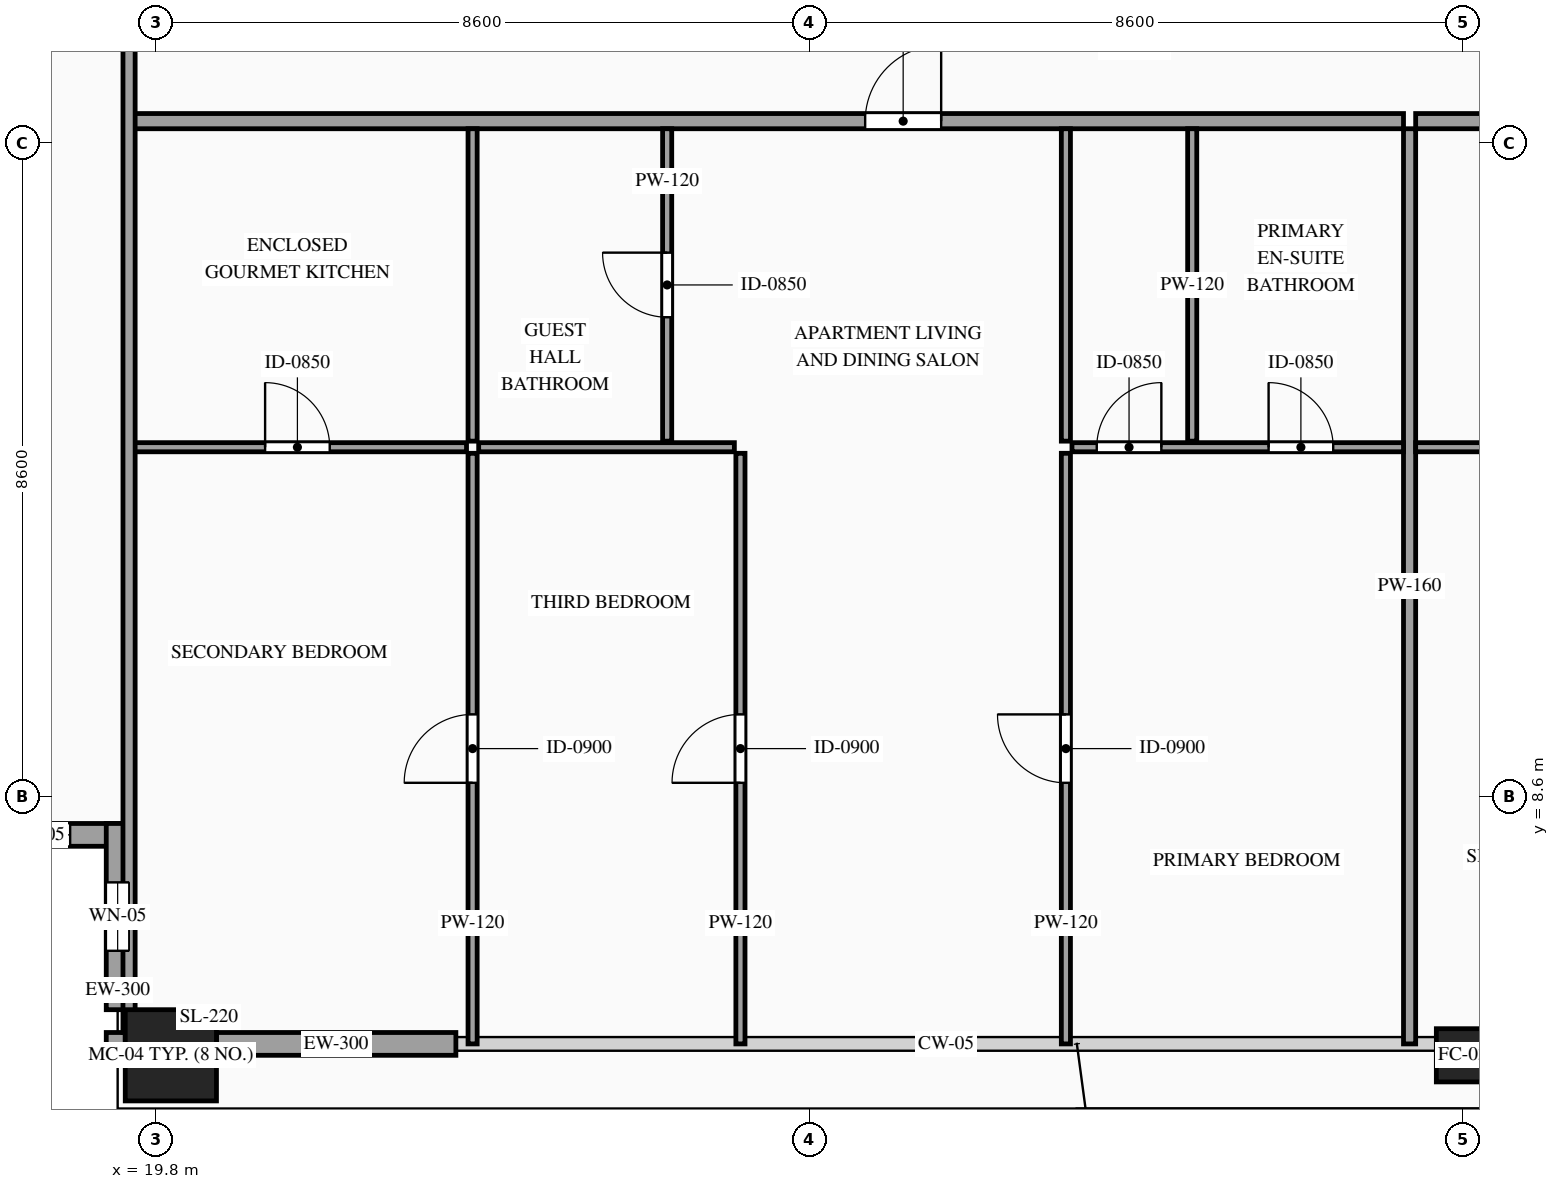
"""IFC4 building model, lengths in metres.
Left out: names, types, materials, properties, quantities, classifications, styles, units other than length and angle.
Written with IfcOpenShell. Run it as: python <this file> out.ifc"""

import sys

from ifc_helpers import new_model, si_unit, direction, frame, frame_2d, origin, origin_2d, place, context, subcontext, project, spatial, rectangle, hollow_rectangle, extrude, source, transform, mapped, element, fill, save


model = new_model("IFC4")
c1 = context("Model", 3, precision=1e-05, world=origin(), true_north=direction((0.0, 1.0)))
c2 = subcontext(c1, "Body", "Model", "MODEL_VIEW")
j1 = project(units=[si_unit("LENGTHUNIT", "METRE"), si_unit("PLANEANGLEUNIT", "RADIAN")], contexts=[c1])
p1 = place(None, origin())
s1 = spatial("IfcSite", under=j1, at=p1, CompositionType="ELEMENT")
p2 = place(p1, origin())
s2 = spatial("IfcBuilding", under=s1, at=p2, CompositionType="ELEMENT")
p3 = place(p2, frame((0.0, 0.0, 255.6)))
s3 = spatial("IfcBuildingStorey", under=s2, at=p3, CompositionType="ELEMENT", Elevation=255.6)
m1 = source(origin(), c2, "Body", "SweptSolid", [
    extrude(hollow_rectangle(XDim=1.2, YDim=1.2, WallThickness=0.055, at=origin_2d()), origin(), (0.0, 0.0, 1.0), 3.5),
])
p4 = place(p3, frame((20.0, 5.2, 0.0), z_axis=(0.0, 0.0, 1.0), x_axis=(1.0, 0.0, 0.0)))
e1 = element("IfcColumn", 1, at=p4, inside=s3, PredefinedType="COLUMN", context=c2, shape_type="MappedRepresentation", body=[
    mapped(m1, transform((0.0, 0.0, 0.0), scale=1.0)),
])
m2 = source(origin(), c2, "Body", "SweptSolid", [
    extrude(hollow_rectangle(XDim=0.7, YDim=0.7, WallThickness=0.032, at=origin_2d()), origin(), (0.0, 0.0, 1.0), 3.5),
])
p5 = place(p3, frame((37.0, 5.2, 0.0), z_axis=(0.0, 0.0, 1.0), x_axis=(1.0, 0.0, 0.0)))
e2 = element("IfcColumn", 2, at=p5, inside=s3, PredefinedType="COLUMN", context=c2, shape_type="MappedRepresentation", body=[
    mapped(m2, transform((0.0, 0.0, 0.0), scale=1.0)),
])
p6 = place(p3, frame((17.0, 8.1, 0.0), z_axis=(0.0, 0.0, 1.0), x_axis=(1.0, 0.0, 0.0)))
e3 = element("IfcWall", 3, at=p6, inside=s3, PredefinedType="SOLIDWALL", context=c2, shape_type="SweptSolid", body=[
    extrude(rectangle(XDim=2.45, YDim=0.3, at=frame_2d((1.225, 0.0))), origin(), (0.0, 0.0, 1.0), 3.2),
])
p7 = place(p6, frame((0.775, 0.0, 0.75)))
e4 = element("IfcOpeningElement", 4, at=p7, cuts=e3, PredefinedType="OPENING", context=c2, shape_type="SweptSolid", body=[
    extrude(rectangle(XDim=0.9, YDim=1.5, at=frame_2d((0.45, 0.75))), frame((0.0, 0.165, 0.0), z_axis=(0.0, -1.0, 0.0), x_axis=(1.0, 0.0, 0.0)), (0.0, 0.0, 1.0), 0.33),
])
p8 = place(p3, frame((19.3, 8.25, 0.0), z_axis=(0.0, 0.0, 1.0), x_axis=(0.0, -1.0, 0.0)))
e5 = element("IfcWall", 5, at=p8, inside=s3, PredefinedType="SOLIDWALL", context=c2, shape_type="SweptSolid", body=[
    extrude(rectangle(XDim=2.45, YDim=0.3, at=frame_2d((1.225, 0.0))), origin(), (0.0, 0.0, 1.0), 3.2),
])
p9 = place(p8, frame((0.775, 0.0, 0.75)))
e6 = element("IfcOpeningElement", 6, at=p9, cuts=e5, PredefinedType="OPENING", context=c2, shape_type="SweptSolid", body=[
    extrude(rectangle(XDim=0.9, YDim=1.5, at=frame_2d((0.45, 0.75))), frame((0.0, 0.165, 0.0), z_axis=(0.0, -1.0, 0.0), x_axis=(1.0, 0.0, 0.0)), (0.0, 0.0, 1.0), 0.33),
])
m3 = source(origin(), c2, "Body", "SweptSolid", [
    extrude(rectangle(XDim=0.25, YDim=0.3, at=frame_2d((0.125, 0.0))), origin(), (0.0, 0.0, 1.0), 3.2),
])
p10 = place(p3, frame((19.15, 5.35, 0.0), z_axis=(0.0, 0.0, 1.0), x_axis=(1.0, 0.0, 0.0)))
e7 = element("IfcWall", 7, at=p10, inside=s3, PredefinedType="SOLIDWALL", context=c2, shape_type="MappedRepresentation", body=[
    mapped(m3, transform((0.0, 0.0, 0.0), scale=1.0)),
])
m4 = source(origin(), c2, "Body", "SweptSolid", [
    extrude(rectangle(XDim=3.15, YDim=0.3, at=frame_2d((1.575, 0.0))), origin(), (0.0, 0.0, 1.0), 2.755),
])
p11 = place(p3, frame((20.6, 5.35, 0.0), z_axis=(0.0, 0.0, 1.0), x_axis=(1.0, 0.0, 0.0)))
e8 = element("IfcWall", 8, at=p11, inside=s3, PredefinedType="SOLIDWALL", context=c2, shape_type="MappedRepresentation", body=[
    mapped(m4, transform((0.0, 0.0, 0.0), scale=1.0)),
])
p12 = place(p3, frame((19.44, 17.49, 0.0), z_axis=(0.0, 0.0, 1.0), x_axis=(1.0, 0.0, 0.0)))
e9 = element("IfcWall", 9, at=p12, inside=s3, PredefinedType="PARTITIONING", context=c2, shape_type="SweptSolid", body=[
    extrude(rectangle(XDim=16.778, YDim=0.2, at=frame_2d((8.389, 0.0))), origin(), (0.0, 0.0, 1.0), 3.2),
])
p13 = place(p12, frame((9.695, 0.0, 0.0)))
e10 = element("IfcOpeningElement", 10, at=p13, cuts=e9, PredefinedType="OPENING", context=c2, shape_type="SweptSolid", body=[
    extrude(rectangle(XDim=1.0, YDim=2.2, at=frame_2d((0.5, 1.1))), frame((0.0, 0.115, 0.0), z_axis=(0.0, -1.0, 0.0), x_axis=(1.0, 0.0, 0.0)), (0.0, 0.0, 1.0), 0.23),
])
m5 = source(origin(), c2, "Body", "SweptSolid", [
    extrude(rectangle(XDim=12.04, YDim=0.16, at=frame_2d((6.02, 0.0))), origin(), (0.0, 0.0, 1.0), 3.2),
])
p14 = place(p3, frame((36.298, 5.35, 0.0), z_axis=(0.0, 0.0, 1.0), x_axis=(0.0, 1.0, 0.0)))
e11 = element("IfcWall", 11, at=p14, inside=s3, PredefinedType="PARTITIONING", context=c2, shape_type="MappedRepresentation", body=[
    mapped(m5, transform((0.0, 0.0, 0.0), scale=1.0)),
])
p15 = place(p3, frame((19.44, 13.2, 0.0), z_axis=(0.0, 0.0, 1.0), x_axis=(1.0, 0.0, 0.0)))
e12 = element("IfcWall", 12, at=p15, inside=s3, PredefinedType="PARTITIONING", context=c2, shape_type="SweptSolid", body=[
    extrude(rectangle(XDim=4.45, YDim=0.12, at=frame_2d((2.225, 0.0))), origin(), (0.0, 0.0, 1.0), 3.2),
])
p16 = place(p15, frame((1.8, 0.0, 0.0)))
e13 = element("IfcOpeningElement", 13, at=p16, cuts=e12, PredefinedType="OPENING", context=c2, shape_type="SweptSolid", body=[
    extrude(rectangle(XDim=0.85, YDim=2.1, at=frame_2d((0.425, 1.05))), frame((0.0, 0.075, 0.0), z_axis=(0.0, -1.0, 0.0), x_axis=(1.0, 0.0, 0.0)), (0.0, 0.0, 1.0), 0.15),
])
m6 = source(origin(), c2, "Body", "SweptSolid", [
    extrude(rectangle(XDim=4.11, YDim=0.12, at=frame_2d((2.055, 0.0))), origin(), (0.0, 0.0, 1.0), 3.2),
])
p17 = place(p3, frame((23.97, 13.28, 0.0), z_axis=(0.0, 0.0, 1.0), x_axis=(0.0, 1.0, 0.0)))
e14 = element("IfcWall", 14, at=p17, inside=s3, PredefinedType="PARTITIONING", context=c2, shape_type="MappedRepresentation", body=[
    mapped(m6, transform((0.0, 0.0, 0.0), scale=1.0)),
])
p18 = place(p3, frame((26.53, 13.28, 0.0), z_axis=(0.0, 0.0, 1.0), x_axis=(0.0, 1.0, 0.0)))
e15 = element("IfcWall", 15, at=p18, inside=s3, PredefinedType="PARTITIONING", context=c2, shape_type="SweptSolid", body=[
    extrude(rectangle(XDim=4.11, YDim=0.12, at=frame_2d((2.055, 0.0))), origin(), (0.0, 0.0, 1.0), 3.2),
])
p19 = place(p18, frame((1.63, 0.0, 0.0)))
e16 = element("IfcOpeningElement", 16, at=p19, cuts=e15, PredefinedType="OPENING", context=c2, shape_type="SweptSolid", body=[
    extrude(rectangle(XDim=0.85, YDim=2.1, at=frame_2d((0.425, 1.05))), frame((0.0, 0.075, 0.0), z_axis=(0.0, -1.0, 0.0), x_axis=(1.0, 0.0, 0.0)), (0.0, 0.0, 1.0), 0.15),
])
for number, where, z_axis, x_axis in (
    (17, (33.438, 13.28, 0.0), (0.0, 0.0, 1.0), (0.0, 1.0, 0.0)),
    (18, (31.776, 13.28, 0.0), (0.0, 0.0, 1.0), (0.0, 1.0, 0.0)),
):
    element("IfcWall", number, at=place(p3, frame(where, z_axis=z_axis, x_axis=x_axis)), inside=s3, PredefinedType="PARTITIONING", context=c2, shape_type="MappedRepresentation", body=[
        mapped(m6, transform((0.0, 0.0, 0.0), scale=1.0)),
    ])
p20 = place(p3, frame((23.97, 5.35, 0.0), z_axis=(0.0, 0.0, 1.0), x_axis=(0.0, 1.0, 0.0)))
e19 = element("IfcWall", 19, at=p20, inside=s3, PredefinedType="PARTITIONING", context=c2, shape_type="SweptSolid", body=[
    extrude(rectangle(XDim=7.77, YDim=0.12, at=frame_2d((3.885, 0.0))), origin(), (0.0, 0.0, 1.0), 3.2),
])
p21 = place(p20, frame((3.435, 0.0, 0.0)))
e20 = element("IfcOpeningElement", 20, at=p21, cuts=e19, PredefinedType="OPENING", context=c2, shape_type="SweptSolid", body=[
    extrude(rectangle(XDim=0.9, YDim=2.15, at=frame_2d((0.45, 1.075))), frame((0.0, 0.075, 0.0), z_axis=(0.0, -1.0, 0.0), x_axis=(1.0, 0.0, 0.0)), (0.0, 0.0, 1.0), 0.15),
])
p22 = place(p3, frame((31.856, 13.2, 0.0), z_axis=(0.0, 0.0, 1.0), x_axis=(1.0, 0.0, 0.0)))
e21 = element("IfcWall", 21, at=p22, inside=s3, PredefinedType="PARTITIONING", context=c2, shape_type="SweptSolid", body=[
    extrude(rectangle(XDim=4.362, YDim=0.12, at=frame_2d((2.181, 0.0))), origin(), (0.0, 0.0, 1.0), 3.2),
])
p23 = place(p22, frame((2.587, 0.0, 0.0)))
e22 = element("IfcOpeningElement", 22, at=p23, cuts=e21, PredefinedType="OPENING", context=c2, shape_type="SweptSolid", body=[
    extrude(rectangle(XDim=0.85, YDim=2.1, at=frame_2d((0.425, 1.05))), frame((0.0, 0.075, 0.0), z_axis=(0.0, -1.0, 0.0), x_axis=(1.0, 0.0, 0.0)), (0.0, 0.0, 1.0), 0.15),
])
p24 = place(p22, frame((0.326, 0.0, 0.0)))
e23 = element("IfcOpeningElement", 23, at=p24, cuts=e21, PredefinedType="OPENING", context=c2, shape_type="SweptSolid", body=[
    extrude(rectangle(XDim=0.85, YDim=2.1, at=frame_2d((0.425, 1.05))), frame((0.0, 0.075, 0.0), z_axis=(0.0, -1.0, 0.0), x_axis=(1.0, 0.0, 0.0)), (0.0, 0.0, 1.0), 0.15),
])
p25 = place(p3, frame((31.776, 5.35, 0.0), z_axis=(0.0, 0.0, 1.0), x_axis=(0.0, 1.0, 0.0)))
e24 = element("IfcWall", 24, at=p25, inside=s3, PredefinedType="PARTITIONING", context=c2, shape_type="SweptSolid", body=[
    extrude(rectangle(XDim=7.77, YDim=0.12, at=frame_2d((3.885, 0.0))), origin(), (0.0, 0.0, 1.0), 3.2),
])
p26 = place(p25, frame((3.435, 0.0, 0.0)))
e25 = element("IfcOpeningElement", 25, at=p26, cuts=e24, PredefinedType="OPENING", context=c2, shape_type="SweptSolid", body=[
    extrude(rectangle(XDim=0.9, YDim=2.15, at=frame_2d((0.45, 1.075))), frame((0.0, 0.075, 0.0), z_axis=(0.0, -1.0, 0.0), x_axis=(1.0, 0.0, 0.0)), (0.0, 0.0, 1.0), 0.15),
])
m7 = source(origin(), c2, "Body", "SweptSolid", [
    extrude(rectangle(XDim=3.364, YDim=0.12, at=frame_2d((1.682, 0.0))), origin(), (0.0, 0.0, 1.0), 3.2),
])
p27 = place(p3, frame((24.05, 13.2, 0.0), z_axis=(0.0, 0.0, 1.0), x_axis=(1.0, 0.0, 0.0)))
e26 = element("IfcWall", 26, at=p27, inside=s3, PredefinedType="PARTITIONING", context=c2, shape_type="MappedRepresentation", body=[
    mapped(m7, transform((0.0, 0.0, 0.0), scale=1.0)),
])
p28 = place(p3, frame((27.494, 5.35, 0.0), z_axis=(0.0, 0.0, 1.0), x_axis=(0.0, 1.0, 0.0)))
e27 = element("IfcWall", 27, at=p28, inside=s3, PredefinedType="PARTITIONING", context=c2, shape_type="SweptSolid", body=[
    extrude(rectangle(XDim=7.77, YDim=0.12, at=frame_2d((3.885, 0.0))), origin(), (0.0, 0.0, 1.0), 3.2),
])
p29 = place(p28, frame((3.435, 0.0, 0.0)))
e28 = element("IfcOpeningElement", 28, at=p29, cuts=e27, PredefinedType="OPENING", context=c2, shape_type="SweptSolid", body=[
    extrude(rectangle(XDim=0.9, YDim=2.15, at=frame_2d((0.45, 1.075))), frame((0.0, 0.075, 0.0), z_axis=(0.0, -1.0, 0.0), x_axis=(1.0, 0.0, 0.0)), (0.0, 0.0, 1.0), 0.15),
])
p30 = place(p3, frame((36.378, 17.49, 0.0), z_axis=(0.0, 0.0, 1.0), x_axis=(1.0, 0.0, 0.0)))
e29 = element("IfcWall", 29, at=p30, inside=s3, PredefinedType="PARTITIONING", context=c2, shape_type="SweptSolid", body=[
    extrude(rectangle(XDim=18.182, YDim=0.2, at=frame_2d((9.091, 0.0))), origin(), (0.0, 0.0, 1.0), 3.2),
])
p31 = place(p30, frame((10.528, 0.0, 0.0)))
e30 = element("IfcOpeningElement", 30, at=p31, cuts=e29, PredefinedType="OPENING", context=c2, shape_type="SweptSolid", body=[
    extrude(rectangle(XDim=1.0, YDim=2.2, at=frame_2d((0.5, 1.1))), frame((0.0, 0.115, 0.0), z_axis=(0.0, -1.0, 0.0), x_axis=(1.0, 0.0, 0.0)), (0.0, 0.0, 1.0), 0.23),
])
p32 = place(p3, frame((36.378, 13.2, 0.0), z_axis=(0.0, 0.0, 1.0), x_axis=(1.0, 0.0, 0.0)))
e31 = element("IfcWall", 31, at=p32, inside=s3, PredefinedType="PARTITIONING", context=c2, shape_type="SweptSolid", body=[
    extrude(rectangle(XDim=4.545, YDim=0.12, at=frame_2d((2.272, 0.0))), origin(), (0.0, 0.0, 1.0), 3.2),
])
p33 = place(p32, frame((1.847, 0.0, 0.0)))
e32 = element("IfcOpeningElement", 32, at=p33, cuts=e31, PredefinedType="OPENING", context=c2, shape_type="SweptSolid", body=[
    extrude(rectangle(XDim=0.85, YDim=2.1, at=frame_2d((0.425, 1.05))), frame((0.0, 0.075, 0.0), z_axis=(0.0, -1.0, 0.0), x_axis=(1.0, 0.0, 0.0)), (0.0, 0.0, 1.0), 0.15),
])
m8 = source(origin(), c2, "Body", "SweptSolid", [
    extrude(rectangle(XDim=26.69, YDim=0.16, at=frame_2d((13.345, 0.0))), origin(), (0.0, 0.0, 1.0), 3.2),
])
p34 = place(p3, frame((19.45, 5.5, 0.0), z_axis=(0.0, 0.0, 1.0), x_axis=(0.0, 1.0, 0.0)))
e33 = element("IfcWall", 33, at=p34, inside=s3, PredefinedType="PARTITIONING", context=c2, shape_type="MappedRepresentation", body=[
    mapped(m8, transform((0.0, 0.0, 0.0), scale=1.0)),
])
m9 = source(origin(), c2, "Body", "SweptSolid", [
    extrude(rectangle(XDim=0.9, YDim=1.5, at=frame_2d((0.45, 0.75))), frame((0.0, 0.03, 0.0), z_axis=(0.0, -1.0, 0.0), x_axis=(1.0, 0.0, 0.0)), (0.0, 0.0, 1.0), 0.06),
])
p35 = place(p7, origin())
e34 = element("IfcWindow", 34, at=p35, inside=s3, PartitioningType="SINGLE_PANEL", PredefinedType="WINDOW", context=c2, shape_type="MappedRepresentation", body=[
    mapped(m9, transform((0.0, 0.0, 0.0), scale=1.0)),
])
fill(e4, e34)
p36 = place(p9, origin())
e35 = element("IfcWindow", 35, at=p36, inside=s3, PartitioningType="SINGLE_PANEL", PredefinedType="WINDOW", context=c2, shape_type="MappedRepresentation", body=[
    mapped(m9, transform((0.0, 0.0, 0.0), scale=1.0)),
])
fill(e6, e35)
m10 = source(origin(), c2, "Body", "SweptSolid", [
    extrude(rectangle(XDim=1.0, YDim=2.2, at=frame_2d((0.5, 1.1))), frame((0.0, 0.025, 0.0), z_axis=(0.0, -1.0, 0.0), x_axis=(1.0, 0.0, 0.0)), (0.0, 0.0, 1.0), 0.05),
])
p37 = place(p13, origin())
e36 = element("IfcDoor", 36, at=p37, inside=s3, OperationType="SINGLE_SWING_RIGHT", PredefinedType="DOOR", context=c2, shape_type="MappedRepresentation", body=[
    mapped(m10, transform((0.0, 0.0, 0.0), scale=1.0)),
])
fill(e10, e36)
m11 = source(origin(), c2, "Body", "SweptSolid", [
    extrude(rectangle(XDim=0.85, YDim=2.1, at=frame_2d((0.425, 1.05))), frame((0.0, 0.025, 0.0), z_axis=(0.0, -1.0, 0.0), x_axis=(1.0, 0.0, 0.0)), (0.0, 0.0, 1.0), 0.05),
])
p38 = place(p16, origin())
e37 = element("IfcDoor", 37, at=p38, inside=s3, OperationType="SINGLE_SWING_LEFT", PredefinedType="DOOR", context=c2, shape_type="MappedRepresentation", body=[
    mapped(m11, transform((0.0, 0.0, 0.0), scale=1.0)),
])
fill(e13, e37)
p39 = place(p19, origin())
e38 = element("IfcDoor", 38, at=p39, inside=s3, OperationType="SINGLE_SWING_RIGHT", PredefinedType="DOOR", context=c2, shape_type="MappedRepresentation", body=[
    mapped(m11, transform((0.0, 0.0, 0.0), scale=1.0)),
])
fill(e16, e38)
p40 = place(p23, origin())
e39 = element("IfcDoor", 39, at=p40, inside=s3, OperationType="SINGLE_SWING_LEFT", PredefinedType="DOOR", context=c2, shape_type="MappedRepresentation", body=[
    mapped(m11, transform((0.0, 0.0, 0.0), scale=1.0)),
])
fill(e22, e39)
p41 = place(p24, origin())
e40 = element("IfcDoor", 40, at=p41, inside=s3, OperationType="SINGLE_SWING_RIGHT", PredefinedType="DOOR", context=c2, shape_type="MappedRepresentation", body=[
    mapped(m11, transform((0.0, 0.0, 0.0), scale=1.0)),
])
fill(e23, e40)
m12 = source(origin(), c2, "Body", "SweptSolid", [
    extrude(rectangle(XDim=0.9, YDim=2.15, at=frame_2d((0.45, 1.075))), frame((0.0, 0.025, 0.0), z_axis=(0.0, -1.0, 0.0), x_axis=(1.0, 0.0, 0.0)), (0.0, 0.0, 1.0), 0.05),
])
p42 = place(p21, origin())
e41 = element("IfcDoor", 41, at=p42, inside=s3, OperationType="SINGLE_SWING_LEFT", PredefinedType="DOOR", context=c2, shape_type="MappedRepresentation", body=[
    mapped(m12, transform((0.0, 0.0, 0.0), scale=1.0)),
])
fill(e20, e41)
p43 = place(p26, origin())
e42 = element("IfcDoor", 42, at=p43, inside=s3, OperationType="SINGLE_SWING_RIGHT", PredefinedType="DOOR", context=c2, shape_type="MappedRepresentation", body=[
    mapped(m12, transform((0.0, 0.0, 0.0), scale=1.0)),
])
fill(e25, e42)
p44 = place(p29, origin())
e43 = element("IfcDoor", 43, at=p44, inside=s3, OperationType="SINGLE_SWING_LEFT", PredefinedType="DOOR", context=c2, shape_type="MappedRepresentation", body=[
    mapped(m12, transform((0.0, 0.0, 0.0), scale=1.0)),
])
fill(e28, e43)
save(model, sys.argv[1])
